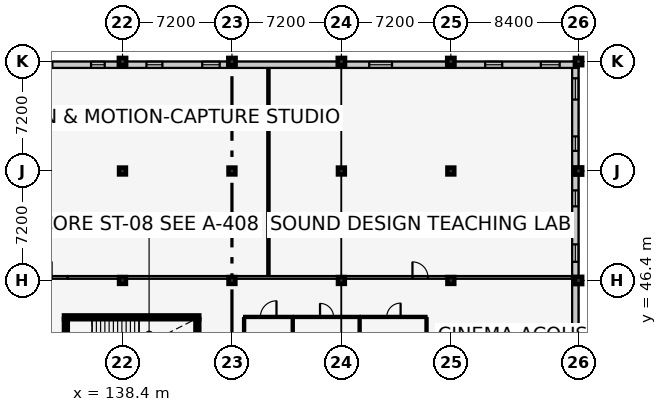
"""IFC4 building model, lengths in metres.
Left out: names, types, materials, properties, quantities, classifications, styles, units other than length and angle.
Written with IfcOpenShell. Run it as: python <this file> out.ifc"""

import sys

from ifc_helpers import new_model, si_unit, direction, frame, frame_2d, origin, origin_2d, place, context, subcontext, project, spatial, rectangle, extrude, element, fill, save


model = new_model("IFC4")
c1 = context("Model", 3, precision=1e-05, world=origin(), true_north=direction((0.0, 1.0)))
c2 = subcontext(c1, "Body", "Model", "MODEL_VIEW")
j1 = project(units=[si_unit("LENGTHUNIT", "METRE"), si_unit("PLANEANGLEUNIT", "RADIAN")], contexts=[c1])
p1 = place(None, origin())
s1 = spatial("IfcSite", under=j1, at=p1, CompositionType="ELEMENT")
p2 = place(p1, origin())
s2 = spatial("IfcBuilding", under=s1, at=p2, CompositionType="ELEMENT")
p3 = place(p2, frame((0.0, 0.0, 9.6)))
s3 = spatial("IfcBuildingStorey", under=s2, at=p3, CompositionType="ELEMENT", Elevation=9.6)
for number, where, z_axis, x_axis in (
    (1, (138.4, 46.4, 0.0), (0.0, 0.0, 1.0), (1.0, 0.0, 0.0)),
    (2, (138.4, 53.6, 0.0), (0.0, 0.0, 1.0), (1.0, 0.0, 0.0)),
):
    element("IfcColumn", number, at=place(p3, frame(where, z_axis=z_axis, x_axis=x_axis)), inside=s3, PredefinedType="COLUMN", context=c2, shape_type="SweptSolid", body=[
        extrude(rectangle(XDim=0.45, YDim=0.45, at=origin_2d()), origin(), (0.0, 0.0, 1.0), 4.2),
    ])
p4 = place(p3, frame((138.4, 60.8, 0.0), z_axis=(0.0, 0.0, 1.0), x_axis=(1.0, 0.0, 0.0)))
e3 = element("IfcColumn", 3, at=p4, inside=s3, PredefinedType="COLUMN", context=c2, shape_type="SweptSolid", body=[
    extrude(rectangle(XDim=0.48, YDim=0.48, at=origin_2d()), origin(), (0.0, 0.0, 1.0), 4.2),
])
for number, where, z_axis, x_axis in (
    (4, (145.6, 46.4, 0.0), (0.0, 0.0, 1.0), (1.0, 0.0, 0.0)),
    (5, (145.6, 53.6, 0.0), (0.0, 0.0, 1.0), (1.0, 0.0, 0.0)),
):
    element("IfcColumn", number, at=place(p3, frame(where, z_axis=z_axis, x_axis=x_axis)), inside=s3, PredefinedType="COLUMN", context=c2, shape_type="SweptSolid", body=[
        extrude(rectangle(XDim=0.45, YDim=0.45, at=origin_2d()), origin(), (0.0, 0.0, 1.0), 4.2),
    ])
p5 = place(p3, frame((145.6, 60.8, 0.0), z_axis=(0.0, 0.0, 1.0), x_axis=(1.0, 0.0, 0.0)))
e6 = element("IfcColumn", 6, at=p5, inside=s3, PredefinedType="COLUMN", context=c2, shape_type="SweptSolid", body=[
    extrude(rectangle(XDim=0.48, YDim=0.48, at=origin_2d()), origin(), (0.0, 0.0, 1.0), 4.2),
])
for number, where, z_axis, x_axis in (
    (7, (152.8, 46.4, 0.0), (0.0, 0.0, 1.0), (1.0, 0.0, 0.0)),
    (8, (152.8, 53.6, 0.0), (0.0, 0.0, 1.0), (1.0, 0.0, 0.0)),
):
    element("IfcColumn", number, at=place(p3, frame(where, z_axis=z_axis, x_axis=x_axis)), inside=s3, PredefinedType="COLUMN", context=c2, shape_type="SweptSolid", body=[
        extrude(rectangle(XDim=0.45, YDim=0.45, at=origin_2d()), origin(), (0.0, 0.0, 1.0), 4.2),
    ])
p6 = place(p3, frame((152.8, 60.8, 0.0), z_axis=(0.0, 0.0, 1.0), x_axis=(1.0, 0.0, 0.0)))
e9 = element("IfcColumn", 9, at=p6, inside=s3, PredefinedType="COLUMN", context=c2, shape_type="SweptSolid", body=[
    extrude(rectangle(XDim=0.48, YDim=0.48, at=origin_2d()), origin(), (0.0, 0.0, 1.0), 4.2),
])
for number, where, z_axis, x_axis in (
    (10, (160.0, 46.4, 0.0), (0.0, 0.0, 1.0), (1.0, 0.0, 0.0)),
    (11, (160.0, 53.6, 0.0), (0.0, 0.0, 1.0), (1.0, 0.0, 0.0)),
):
    element("IfcColumn", number, at=place(p3, frame(where, z_axis=z_axis, x_axis=x_axis)), inside=s3, PredefinedType="COLUMN", context=c2, shape_type="SweptSolid", body=[
        extrude(rectangle(XDim=0.45, YDim=0.45, at=origin_2d()), origin(), (0.0, 0.0, 1.0), 4.2),
    ])
for number, where, z_axis, x_axis in (
    (12, (160.0, 60.8, 0.0), (0.0, 0.0, 1.0), (1.0, 0.0, 0.0)),
    (13, (168.4, 46.4, 0.0), (0.0, 0.0, 1.0), (1.0, 0.0, 0.0)),
    (14, (168.4, 53.6, 0.0), (0.0, 0.0, 1.0), (1.0, 0.0, 0.0)),
    (15, (168.4, 60.8, 0.0), (0.0, 0.0, 1.0), (1.0, 0.0, 0.0)),
):
    element("IfcColumn", number, at=place(p3, frame(where, z_axis=z_axis, x_axis=x_axis)), inside=s3, PredefinedType="COLUMN", context=c2, shape_type="SweptSolid", body=[
        extrude(rectangle(XDim=0.48, YDim=0.48, at=origin_2d()), origin(), (0.0, 0.0, 1.0), 4.2),
    ])
p7 = place(p3, frame((168.19, 60.8, 0.0), z_axis=(0.0, 0.0, 1.0), x_axis=(0.0, -1.0, 0.0)))
e16 = element("IfcWall", 16, at=p7, inside=s3, PredefinedType="SOLIDWALL", context=c2, shape_type="SweptSolid", body=[
    extrude(rectangle(XDim=21.6, YDim=0.42, at=frame_2d((10.8, 0.0))), origin(), (0.0, 0.0, 1.0), 3.355),
])
p8 = place(p7, frame((1.1, 0.0, 0.9)))
e17 = element("IfcOpeningElement", 17, at=p8, cuts=e16, PredefinedType="OPENING", context=c2, shape_type="SweptSolid", body=[
    extrude(rectangle(XDim=1.4, YDim=1.35, at=frame_2d((0.7, 0.675))), frame((0.0, 0.222, 0.0), z_axis=(0.0, -1.0, 0.0), x_axis=(1.0, 0.0, 0.0)), (0.0, 0.0, 1.0), 0.444),
])
p9 = place(p7, frame((4.925, 0.0, 0.9)))
e18 = element("IfcOpeningElement", 18, at=p9, cuts=e16, PredefinedType="OPENING", context=c2, shape_type="SweptSolid", body=[
    extrude(rectangle(XDim=0.95, YDim=1.45, at=frame_2d((0.475, 0.725))), frame((0.0, 0.222, 0.0), z_axis=(0.0, -1.0, 0.0), x_axis=(1.0, 0.0, 0.0)), (0.0, 0.0, 1.0), 0.444),
])
p10 = place(p7, frame((8.475, 0.0, 0.9)))
e19 = element("IfcOpeningElement", 19, at=p10, cuts=e16, PredefinedType="OPENING", context=c2, shape_type="SweptSolid", body=[
    extrude(rectangle(XDim=1.05, YDim=1.45, at=frame_2d((0.525, 0.725))), frame((0.0, 0.222, 0.0), z_axis=(0.0, -1.0, 0.0), x_axis=(1.0, 0.0, 0.0)), (0.0, 0.0, 1.0), 0.444),
])
p11 = place(p7, frame((12.025, 0.0, 0.9)))
e20 = element("IfcOpeningElement", 20, at=p11, cuts=e16, PredefinedType="OPENING", context=c2, shape_type="SweptSolid", body=[
    extrude(rectangle(XDim=1.15, YDim=1.45, at=frame_2d((0.575, 0.725))), frame((0.0, 0.222, 0.0), z_axis=(0.0, -1.0, 0.0), x_axis=(1.0, 0.0, 0.0)), (0.0, 0.0, 1.0), 0.444),
])
p12 = place(p7, frame((19.125, 0.0, 0.9)))
e21 = element("IfcOpeningElement", 21, at=p12, cuts=e16, PredefinedType="OPENING", context=c2, shape_type="SweptSolid", body=[
    extrude(rectangle(XDim=1.35, YDim=1.45, at=frame_2d((0.675, 0.725))), frame((0.0, 0.222, 0.0), z_axis=(0.0, -1.0, 0.0), x_axis=(1.0, 0.0, 0.0)), (0.0, 0.0, 1.0), 0.444),
])
p13 = place(p3, frame((131.2, 60.59, 0.0), z_axis=(0.0, 0.0, 1.0), x_axis=(1.0, 0.0, 0.0)))
e22 = element("IfcWall", 22, at=p13, inside=s3, PredefinedType="SOLIDWALL", context=c2, shape_type="SweptSolid", body=[
    extrude(rectangle(XDim=37.2, YDim=0.42, at=frame_2d((18.6, 0.0))), origin(), (0.0, 0.0, 1.0), 3.115),
])
p14 = place(p13, frame((1.135, 0.0, 0.9)))
e23 = element("IfcOpeningElement", 23, at=p14, cuts=e22, PredefinedType="OPENING", context=c2, shape_type="SweptSolid", body=[
    extrude(rectangle(XDim=1.45, YDim=1.45, at=frame_2d((0.725, 0.725))), frame((0.0, 0.222, 0.0), z_axis=(0.0, -1.0, 0.0), x_axis=(1.0, 0.0, 0.0)), (0.0, 0.0, 1.0), 0.444),
])
p15 = place(p13, frame((5.13, 0.0, 0.9)))
e24 = element("IfcOpeningElement", 24, at=p15, cuts=e22, PredefinedType="OPENING", context=c2, shape_type="SweptSolid", body=[
    extrude(rectangle(XDim=0.9, YDim=1.6, at=frame_2d((0.45, 0.8))), frame((0.0, 0.222, 0.0), z_axis=(0.0, -1.0, 0.0), x_axis=(1.0, 0.0, 0.0)), (0.0, 0.0, 1.0), 0.444),
])
p16 = place(p13, frame((8.775, 0.0, 0.9)))
e25 = element("IfcOpeningElement", 25, at=p16, cuts=e22, PredefinedType="OPENING", context=c2, shape_type="SweptSolid", body=[
    extrude(rectangle(XDim=1.05, YDim=1.6, at=frame_2d((0.525, 0.8))), frame((0.0, 0.222, 0.0), z_axis=(0.0, -1.0, 0.0), x_axis=(1.0, 0.0, 0.0)), (0.0, 0.0, 1.0), 0.444),
])
p17 = place(p13, frame((12.445, 0.0, 0.9)))
e26 = element("IfcOpeningElement", 26, at=p17, cuts=e22, PredefinedType="OPENING", context=c2, shape_type="SweptSolid", body=[
    extrude(rectangle(XDim=1.15, YDim=1.6, at=frame_2d((0.575, 0.8))), frame((0.0, 0.222, 0.0), z_axis=(0.0, -1.0, 0.0), x_axis=(1.0, 0.0, 0.0)), (0.0, 0.0, 1.0), 0.444),
])
p18 = place(p13, frame((23.43, 0.0, 0.9)))
e27 = element("IfcOpeningElement", 27, at=p18, cuts=e22, PredefinedType="OPENING", context=c2, shape_type="SweptSolid", body=[
    extrude(rectangle(XDim=1.5, YDim=1.6, at=frame_2d((0.75, 0.8))), frame((0.0, 0.222, 0.0), z_axis=(0.0, -1.0, 0.0), x_axis=(1.0, 0.0, 0.0)), (0.0, 0.0, 1.0), 0.444),
])
p19 = place(p13, frame((31.06, 0.0, 0.9)))
e28 = element("IfcOpeningElement", 28, at=p19, cuts=e22, PredefinedType="OPENING", context=c2, shape_type="SweptSolid", body=[
    extrude(rectangle(XDim=1.12, YDim=1.75, at=frame_2d((0.56, 0.875))), frame((0.0, 0.222, 0.0), z_axis=(0.0, -1.0, 0.0), x_axis=(1.0, 0.0, 0.0)), (0.0, 0.0, 1.0), 0.444),
])
p20 = place(p13, frame((34.72, 0.0, 0.9)))
e29 = element("IfcOpeningElement", 29, at=p20, cuts=e22, PredefinedType="OPENING", context=c2, shape_type="SweptSolid", body=[
    extrude(rectangle(XDim=1.24, YDim=1.75, at=frame_2d((0.62, 0.875))), frame((0.0, 0.222, 0.0), z_axis=(0.0, -1.0, 0.0), x_axis=(1.0, 0.0, 0.0)), (0.0, 0.0, 1.0), 0.444),
])
p21 = place(p3, frame((143.45, 43.975, 0.0), z_axis=(0.0, 0.0, 1.0), x_axis=(-1.0, 0.0, 0.0)))
e30 = element("IfcWall", 30, at=p21, inside=s3, PredefinedType="SHEAR", context=c2, shape_type="SweptSolid", body=[
    extrude(rectangle(XDim=8.9, YDim=0.25, at=frame_2d((4.45, 0.0))), origin(), (0.0, 0.0, 1.0), 3.96),
])
p22 = place(p3, frame((134.675, 43.85, 0.0), z_axis=(0.0, 0.0, 1.0), x_axis=(0.0, -1.0, 0.0)))
e31 = element("IfcWall", 31, at=p22, inside=s3, PredefinedType="SHEAR", context=c2, shape_type="SweptSolid", body=[
    extrude(rectangle(XDim=3.45, YDim=0.25, at=frame_2d((1.725, 0.0))), origin(), (0.0, 0.0, 1.0), 3.96),
])
p23 = place(p22, frame((1.125, 0.0, 0.0)))
e32 = element("IfcOpeningElement", 32, at=p23, cuts=e31, PredefinedType="OPENING", context=c2, shape_type="SweptSolid", body=[
    extrude(rectangle(XDim=1.2, YDim=2.15, at=frame_2d((0.6, 1.075))), frame((0.0, 0.137, 0.0), z_axis=(0.0, -1.0, 0.0), x_axis=(1.0, 0.0, 0.0)), (0.0, 0.0, 1.0), 0.274),
])
p24 = place(p3, frame((143.325, 40.4, 0.0), z_axis=(0.0, 0.0, 1.0), x_axis=(0.0, 1.0, 0.0)))
e33 = element("IfcWall", 33, at=p24, inside=s3, PredefinedType="SHEAR", context=c2, shape_type="SweptSolid", body=[
    extrude(rectangle(XDim=3.45, YDim=0.25, at=frame_2d((1.725, 0.0))), origin(), (0.0, 0.0, 1.0), 3.96),
])
p25 = place(p3, frame((131.63, 46.6, 0.0), z_axis=(0.0, 0.0, 1.0), x_axis=(1.0, 0.0, 0.0)))
e34 = element("IfcWall", 34, at=p25, inside=s3, PredefinedType="PARTITIONING", context=c2, shape_type="SweptSolid", body=[
    extrude(rectangle(XDim=3.17, YDim=0.18, at=frame_2d((1.585, 0.0))), origin(), (0.0, 0.0, 1.0), 3.285),
])
p26 = place(p25, frame((1.065, 0.0, 0.0)))
e35 = element("IfcOpeningElement", 35, at=p26, cuts=e34, PredefinedType="OPENING", context=c2, shape_type="SweptSolid", body=[
    extrude(rectangle(XDim=1.04, YDim=2.15, at=frame_2d((0.52, 1.075))), frame((0.0, 0.102, 0.0), z_axis=(0.0, -1.0, 0.0), x_axis=(1.0, 0.0, 0.0)), (0.0, 0.0, 1.0), 0.204),
])
p27 = place(p3, frame((134.8, 46.6, 0.0), z_axis=(0.0, 0.0, 1.0), x_axis=(1.0, 0.0, 0.0)))
e36 = element("IfcWall", 36, at=p27, inside=s3, PredefinedType="PARTITIONING", context=c2, shape_type="SweptSolid", body=[
    extrude(rectangle(XDim=33.17, YDim=0.18, at=frame_2d((16.585, 0.0))), origin(), (0.0, 0.0, 1.0), 2.835),
])
p28 = place(p27, frame((22.675, 0.0, 0.0)))
e37 = element("IfcOpeningElement", 37, at=p28, cuts=e36, PredefinedType="OPENING", context=c2, shape_type="SweptSolid", body=[
    extrude(rectangle(XDim=1.02, YDim=2.12, at=frame_2d((0.51, 1.06))), frame((0.0, 0.102, 0.0), z_axis=(0.0, -1.0, 0.0), x_axis=(1.0, 0.0, 0.0)), (0.0, 0.0, 1.0), 0.204),
])
p29 = place(p3, frame((148.0, 46.7, 0.0), z_axis=(0.0, 0.0, 1.0), x_axis=(0.0, 1.0, 0.0)))
e38 = element("IfcWall", 38, at=p29, inside=s3, PredefinedType="PARTITIONING", context=c2, shape_type="SweptSolid", body=[
    extrude(rectangle(XDim=13.67, YDim=0.15, at=frame_2d((6.835, 0.0))), origin(), (0.0, 0.0, 1.0), 3.96),
])
p30 = place(p3, frame((146.4, 44.0, 0.0), z_axis=(0.0, 0.0, 1.0), x_axis=(1.0, 0.0, 0.0)))
e39 = element("IfcWall", 39, at=p30, inside=s3, PredefinedType="PARTITIONING", context=c2, shape_type="SweptSolid", body=[
    extrude(rectangle(XDim=3.2, YDim=0.14, at=frame_2d((1.6, 0.0))), origin(), (0.0, 0.0, 1.0), 3.96),
])
p31 = place(p30, frame((1.07, 0.0, 0.0)))
e40 = element("IfcOpeningElement", 40, at=p31, cuts=e39, PredefinedType="OPENING", context=c2, shape_type="SweptSolid", body=[
    extrude(rectangle(XDim=1.06, YDim=2.1, at=frame_2d((0.53, 1.05))), frame((0.0, 0.082, 0.0), z_axis=(0.0, -1.0, 0.0), x_axis=(1.0, 0.0, 0.0)), (0.0, 0.0, 1.0), 0.164),
])
for number, where, z_axis, x_axis in (
    (41, (146.4, 39.63, 0.0), (0.0, 0.0, 1.0), (0.0, 1.0, 0.0)),
    (42, (149.6, 39.63, 0.0), (0.0, 0.0, 1.0), (0.0, 1.0, 0.0)),
):
    element("IfcWall", number, at=place(p3, frame(where, z_axis=z_axis, x_axis=x_axis)), inside=s3, PredefinedType="PARTITIONING", context=c2, shape_type="SweptSolid", body=[
        extrude(rectangle(XDim=4.29, YDim=0.14, at=frame_2d((2.145, 0.0))), origin(), (0.0, 0.0, 1.0), 3.96),
    ])
p32 = place(p3, frame((149.68, 44.0, 0.0), z_axis=(0.0, 0.0, 1.0), x_axis=(1.0, 0.0, 0.0)))
e43 = element("IfcWall", 43, at=p32, inside=s3, PredefinedType="PARTITIONING", context=c2, shape_type="SweptSolid", body=[
    extrude(rectangle(XDim=4.32, YDim=0.14, at=frame_2d((2.16, 0.0))), origin(), (0.0, 0.0, 1.0), 3.96),
])
p33 = place(p32, frame((1.715, 0.0, 0.0)))
e44 = element("IfcOpeningElement", 44, at=p33, cuts=e43, PredefinedType="OPENING", context=c2, shape_type="SweptSolid", body=[
    extrude(rectangle(XDim=0.89, YDim=2.05, at=frame_2d((0.445, 1.025))), frame((0.0, 0.082, 0.0), z_axis=(0.0, -1.0, 0.0), x_axis=(1.0, 0.0, 0.0)), (0.0, 0.0, 1.0), 0.164),
])
p34 = place(p3, frame((154.0, 39.63, 0.0), z_axis=(0.0, 0.0, 1.0), x_axis=(0.0, 1.0, 0.0)))
e45 = element("IfcWall", 45, at=p34, inside=s3, PredefinedType="PARTITIONING", context=c2, shape_type="SweptSolid", body=[
    extrude(rectangle(XDim=4.29, YDim=0.14, at=frame_2d((2.145, 0.0))), origin(), (0.0, 0.0, 1.0), 3.96),
])
p35 = place(p3, frame((154.08, 44.0, 0.0), z_axis=(0.0, 0.0, 1.0), x_axis=(1.0, 0.0, 0.0)))
e46 = element("IfcWall", 46, at=p35, inside=s3, PredefinedType="PARTITIONING", context=c2, shape_type="SweptSolid", body=[
    extrude(rectangle(XDim=4.32, YDim=0.14, at=frame_2d((2.16, 0.0))), origin(), (0.0, 0.0, 1.0), 3.96),
])
p36 = place(p35, frame((1.705, 0.0, 0.0)))
e47 = element("IfcOpeningElement", 47, at=p36, cuts=e46, PredefinedType="OPENING", context=c2, shape_type="SweptSolid", body=[
    extrude(rectangle(XDim=0.91, YDim=2.06, at=frame_2d((0.455, 1.03))), frame((0.0, 0.082, 0.0), z_axis=(0.0, -1.0, 0.0), x_axis=(1.0, 0.0, 0.0)), (0.0, 0.0, 1.0), 0.164),
])
p37 = place(p3, frame((158.4, 39.63, 0.0), z_axis=(0.0, 0.0, 1.0), x_axis=(0.0, 1.0, 0.0)))
e48 = element("IfcWall", 48, at=p37, inside=s3, PredefinedType="PARTITIONING", context=c2, shape_type="SweptSolid", body=[
    extrude(rectangle(XDim=4.29, YDim=0.14, at=frame_2d((2.145, 0.0))), origin(), (0.0, 0.0, 1.0), 3.96),
])
p38 = place(p8, origin())
e49 = element("IfcWindow", 49, at=p38, inside=s3, PartitioningType="SINGLE_PANEL", PredefinedType="WINDOW", context=c2, shape_type="SweptSolid", body=[
    extrude(rectangle(XDim=1.4, YDim=1.35, at=frame_2d((0.7, 0.675))), frame((0.0, 0.03, 0.0), z_axis=(0.0, -1.0, 0.0), x_axis=(1.0, 0.0, 0.0)), (0.0, 0.0, 1.0), 0.06),
])
fill(e17, e49)
p39 = place(p9, origin())
e50 = element("IfcWindow", 50, at=p39, inside=s3, PartitioningType="SINGLE_PANEL", PredefinedType="WINDOW", context=c2, shape_type="SweptSolid", body=[
    extrude(rectangle(XDim=0.95, YDim=1.45, at=frame_2d((0.475, 0.725))), frame((0.0, 0.03, 0.0), z_axis=(0.0, -1.0, 0.0), x_axis=(1.0, 0.0, 0.0)), (0.0, 0.0, 1.0), 0.06),
])
fill(e18, e50)
p40 = place(p10, origin())
e51 = element("IfcWindow", 51, at=p40, inside=s3, PartitioningType="SINGLE_PANEL", PredefinedType="WINDOW", context=c2, shape_type="SweptSolid", body=[
    extrude(rectangle(XDim=1.05, YDim=1.45, at=frame_2d((0.525, 0.725))), frame((0.0, 0.03, 0.0), z_axis=(0.0, -1.0, 0.0), x_axis=(1.0, 0.0, 0.0)), (0.0, 0.0, 1.0), 0.06),
])
fill(e19, e51)
p41 = place(p11, origin())
e52 = element("IfcWindow", 52, at=p41, inside=s3, PartitioningType="SINGLE_PANEL", PredefinedType="WINDOW", context=c2, shape_type="SweptSolid", body=[
    extrude(rectangle(XDim=1.15, YDim=1.45, at=frame_2d((0.575, 0.725))), frame((0.0, 0.03, 0.0), z_axis=(0.0, -1.0, 0.0), x_axis=(1.0, 0.0, 0.0)), (0.0, 0.0, 1.0), 0.06),
])
fill(e20, e52)
p42 = place(p15, origin())
e53 = element("IfcWindow", 53, at=p42, inside=s3, PartitioningType="SINGLE_PANEL", PredefinedType="WINDOW", context=c2, shape_type="SweptSolid", body=[
    extrude(rectangle(XDim=0.9, YDim=1.6, at=frame_2d((0.45, 0.8))), frame((0.0, 0.03, 0.0), z_axis=(0.0, -1.0, 0.0), x_axis=(1.0, 0.0, 0.0)), (0.0, 0.0, 1.0), 0.06),
])
fill(e24, e53)
p43 = place(p16, origin())
e54 = element("IfcWindow", 54, at=p43, inside=s3, PartitioningType="SINGLE_PANEL", PredefinedType="WINDOW", context=c2, shape_type="SweptSolid", body=[
    extrude(rectangle(XDim=1.05, YDim=1.6, at=frame_2d((0.525, 0.8))), frame((0.0, 0.03, 0.0), z_axis=(0.0, -1.0, 0.0), x_axis=(1.0, 0.0, 0.0)), (0.0, 0.0, 1.0), 0.06),
])
fill(e25, e54)
p44 = place(p17, origin())
e55 = element("IfcWindow", 55, at=p44, inside=s3, PartitioningType="SINGLE_PANEL", PredefinedType="WINDOW", context=c2, shape_type="SweptSolid", body=[
    extrude(rectangle(XDim=1.15, YDim=1.6, at=frame_2d((0.575, 0.8))), frame((0.0, 0.03, 0.0), z_axis=(0.0, -1.0, 0.0), x_axis=(1.0, 0.0, 0.0)), (0.0, 0.0, 1.0), 0.06),
])
fill(e26, e55)
p45 = place(p18, origin())
e56 = element("IfcWindow", 56, at=p45, inside=s3, PartitioningType="SINGLE_PANEL", PredefinedType="WINDOW", context=c2, shape_type="SweptSolid", body=[
    extrude(rectangle(XDim=1.5, YDim=1.6, at=frame_2d((0.75, 0.8))), frame((0.0, 0.03, 0.0), z_axis=(0.0, -1.0, 0.0), x_axis=(1.0, 0.0, 0.0)), (0.0, 0.0, 1.0), 0.06),
])
fill(e27, e56)
p46 = place(p19, origin())
e57 = element("IfcWindow", 57, at=p46, inside=s3, PartitioningType="SINGLE_PANEL", PredefinedType="WINDOW", context=c2, shape_type="SweptSolid", body=[
    extrude(rectangle(XDim=1.12, YDim=1.75, at=frame_2d((0.56, 0.875))), frame((0.0, 0.03, 0.0), z_axis=(0.0, -1.0, 0.0), x_axis=(1.0, 0.0, 0.0)), (0.0, 0.0, 1.0), 0.06),
])
fill(e28, e57)
p47 = place(p20, origin())
e58 = element("IfcWindow", 58, at=p47, inside=s3, PartitioningType="SINGLE_PANEL", PredefinedType="WINDOW", context=c2, shape_type="SweptSolid", body=[
    extrude(rectangle(XDim=1.24, YDim=1.75, at=frame_2d((0.62, 0.875))), frame((0.0, 0.03, 0.0), z_axis=(0.0, -1.0, 0.0), x_axis=(1.0, 0.0, 0.0)), (0.0, 0.0, 1.0), 0.06),
])
fill(e29, e58)
p48 = place(p28, origin())
e59 = element("IfcDoor", 59, at=p48, inside=s3, OperationType="SINGLE_SWING_LEFT", PredefinedType="DOOR", context=c2, shape_type="SweptSolid", body=[
    extrude(rectangle(XDim=1.02, YDim=2.12, at=frame_2d((0.51, 1.06))), frame((0.0, 0.025, 0.0), z_axis=(0.0, -1.0, 0.0), x_axis=(1.0, 0.0, 0.0)), (0.0, 0.0, 1.0), 0.05),
])
fill(e37, e59)
p49 = place(p31, origin())
e60 = element("IfcDoor", 60, at=p49, inside=s3, OperationType="SINGLE_SWING_RIGHT", PredefinedType="DOOR", context=c2, shape_type="SweptSolid", body=[
    extrude(rectangle(XDim=1.06, YDim=2.1, at=frame_2d((0.53, 1.05))), frame((0.0, 0.025, 0.0), z_axis=(0.0, -1.0, 0.0), x_axis=(1.0, 0.0, 0.0)), (0.0, 0.0, 1.0), 0.05),
])
fill(e40, e60)
p50 = place(p33, origin())
e61 = element("IfcDoor", 61, at=p50, inside=s3, OperationType="SINGLE_SWING_LEFT", PredefinedType="DOOR", context=c2, shape_type="SweptSolid", body=[
    extrude(rectangle(XDim=0.89, YDim=2.05, at=frame_2d((0.445, 1.025))), frame((0.0, 0.025, 0.0), z_axis=(0.0, -1.0, 0.0), x_axis=(1.0, 0.0, 0.0)), (0.0, 0.0, 1.0), 0.05),
])
fill(e44, e61)
p51 = place(p36, origin())
e62 = element("IfcDoor", 62, at=p51, inside=s3, OperationType="SINGLE_SWING_RIGHT", PredefinedType="DOOR", context=c2, shape_type="SweptSolid", body=[
    extrude(rectangle(XDim=0.91, YDim=2.06, at=frame_2d((0.455, 1.03))), frame((0.0, 0.025, 0.0), z_axis=(0.0, -1.0, 0.0), x_axis=(1.0, 0.0, 0.0)), (0.0, 0.0, 1.0), 0.05),
])
fill(e47, e62)
save(model, sys.argv[1])
